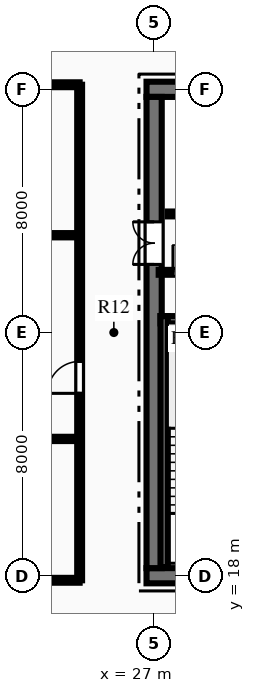
"""IFC4 building model, lengths in metres.
Left out: names, types, materials, properties, quantities, classifications, styles, units other than length and angle.
Written with IfcOpenShell. Run it as: python <this file> out.ifc"""

import sys

from ifc_helpers import new_model, si_unit, direction, frame, frame_2d, origin, place, context, subcontext, project, spatial, rectangle, extrude, element, fill, save


model = new_model("IFC4")
c1 = context("Model", 3, precision=1e-05, world=origin(), true_north=direction((0.0, 1.0)))
c2 = subcontext(c1, "Body", "Model", "MODEL_VIEW")
j1 = project(units=[si_unit("LENGTHUNIT", "METRE"), si_unit("PLANEANGLEUNIT", "RADIAN")], contexts=[c1])
p1 = place(None, origin())
s1 = spatial("IfcSite", under=j1, at=p1, CompositionType="ELEMENT")
p2 = place(p1, origin())
s2 = spatial("IfcBuilding", under=s1, at=p2, CompositionType="ELEMENT")
p3 = place(p2, frame((0.0, 0.0, 205.95)))
s3 = spatial("IfcBuildingStorey", under=s2, at=p3, CompositionType="ELEMENT", Elevation=205.95)
p4 = place(p3, frame((26.75, 18.0, 0.0), z_axis=(0.0, 0.0, 1.0), x_axis=(1.0, 0.0, 0.0)))
e1 = element("IfcWall", 1, at=p4, inside=s3, PredefinedType="SHEAR", context=c2, shape_type="SweptSolid", body=[
    extrude(rectangle(XDim=18.5, YDim=0.5, at=frame_2d((9.25, 0.0))), origin(), (0.0, 0.0, 1.0), 3.75),
])
p5 = place(p4, frame((7.35, 0.0, 0.0)))
e2 = element("IfcOpeningElement", 2, at=p5, cuts=e1, PredefinedType="OPENING", context=c2, shape_type="SweptSolid", body=[
    extrude(rectangle(XDim=1.1, YDim=2.15, at=frame_2d((0.55, 1.075))), frame((0.0, 0.26, 0.0), z_axis=(0.0, -1.0, 0.0), x_axis=(1.0, 0.0, 0.0)), (0.0, 0.0, 1.0), 0.52),
])
p6 = place(p4, frame((10.05, 0.0, 0.0)))
e3 = element("IfcOpeningElement", 3, at=p6, cuts=e1, PredefinedType="OPENING", context=c2, shape_type="SweptSolid", body=[
    extrude(rectangle(XDim=1.1, YDim=2.15, at=frame_2d((0.55, 1.075))), frame((0.0, 0.26, 0.0), z_axis=(0.0, -1.0, 0.0), x_axis=(1.0, 0.0, 0.0)), (0.0, 0.0, 1.0), 0.52),
])
p7 = place(p3, frame((26.75, 34.0, 0.0), z_axis=(0.0, 0.0, 1.0), x_axis=(1.0, 0.0, 0.0)))
e4 = element("IfcWall", 4, at=p7, inside=s3, PredefinedType="SHEAR", context=c2, shape_type="SweptSolid", body=[
    extrude(rectangle(XDim=18.5, YDim=0.5, at=frame_2d((9.25, 0.0))), origin(), (0.0, 0.0, 1.0), 3.75),
])
p8 = place(p7, frame((13.935, 0.0, 0.0)))
e5 = element("IfcOpeningElement", 5, at=p8, cuts=e4, PredefinedType="OPENING", context=c2, shape_type="SweptSolid", body=[
    extrude(rectangle(XDim=1.1, YDim=2.15, at=frame_2d((0.55, 1.075))), frame((0.0, 0.26, 0.0), z_axis=(0.0, -1.0, 0.0), x_axis=(1.0, 0.0, 0.0)), (0.0, 0.0, 1.0), 0.52),
])
p9 = place(p7, frame((16.185, 0.0, 0.0)))
e6 = element("IfcOpeningElement", 6, at=p9, cuts=e4, PredefinedType="OPENING", context=c2, shape_type="SweptSolid", body=[
    extrude(rectangle(XDim=1.1, YDim=2.15, at=frame_2d((0.55, 1.075))), frame((0.0, 0.26, 0.0), z_axis=(0.0, -1.0, 0.0), x_axis=(1.0, 0.0, 0.0)), (0.0, 0.0, 1.0), 0.52),
])
p10 = place(p3, frame((27.0, 18.25, 0.0), z_axis=(0.0, 0.0, 1.0), x_axis=(0.0, 1.0, 0.0)))
e7 = element("IfcWall", 7, at=p10, inside=s3, PredefinedType="SHEAR", context=c2, shape_type="SweptSolid", body=[
    extrude(rectangle(XDim=15.5, YDim=0.5, at=frame_2d((7.75, 0.0))), origin(), (0.0, 0.0, 1.0), 3.75),
])
p11 = place(p10, frame((9.99, 0.0, 0.0)))
e8 = element("IfcOpeningElement", 8, at=p11, cuts=e7, PredefinedType="OPENING", context=c2, shape_type="SweptSolid", body=[
    extrude(rectangle(XDim=1.4, YDim=2.2, at=frame_2d((0.7, 1.1))), frame((0.0, 0.26, 0.0), z_axis=(0.0, -1.0, 0.0), x_axis=(1.0, 0.0, 0.0)), (0.0, 0.0, 1.0), 0.52),
])
p12 = place(p3, frame((27.21, 26.42, 0.0), z_axis=(0.0, 0.0, 1.0), x_axis=(1.0, 0.0, 0.0)))
e9 = element("IfcWall", 9, at=p12, inside=s3, PredefinedType="SHEAR", context=c2, shape_type="SweptSolid", body=[
    extrude(rectangle(XDim=3.98, YDim=0.24, at=frame_2d((1.99, 0.0))), origin(), (0.0, 0.0, 1.0), 3.75),
])
p13 = place(p3, frame((27.33, 18.28, 0.0), z_axis=(0.0, 0.0, 1.0), x_axis=(0.0, 1.0, 0.0)))
e10 = element("IfcWall", 10, at=p13, inside=s3, PredefinedType="SHEAR", context=c2, shape_type="SweptSolid", body=[
    extrude(rectangle(XDim=8.26, YDim=0.24, at=frame_2d((4.13, 0.0))), origin(), (0.0, 0.0, 1.0), 3.75),
])
p14 = place(p3, frame((27.15, 27.98, 0.0), z_axis=(0.0, 0.0, 1.0), x_axis=(1.0, 0.0, 0.0)))
e11 = element("IfcWall", 11, at=p14, inside=s3, PredefinedType="PARTITIONING", context=c2, shape_type="SweptSolid", body=[
    extrude(rectangle(XDim=4.05, YDim=0.16, at=frame_2d((2.025, 0.0))), origin(), (0.0, 0.0, 1.0), 3.47),
])
p15 = place(p14, frame((0.47, 0.0, 0.0)))
e12 = element("IfcOpeningElement", 12, at=p15, cuts=e11, PredefinedType="OPENING", context=c2, shape_type="SweptSolid", body=[
    extrude(rectangle(XDim=0.9, YDim=2.15, at=frame_2d((0.45, 1.075))), frame((0.0, 0.09, 0.0), z_axis=(0.0, -1.0, 0.0), x_axis=(1.0, 0.0, 0.0)), (0.0, 0.0, 1.0), 0.18),
])
p16 = place(p14, frame((2.36, 0.0, 0.0)))
e13 = element("IfcOpeningElement", 13, at=p16, cuts=e11, PredefinedType="OPENING", context=c2, shape_type="SweptSolid", body=[
    extrude(rectangle(XDim=0.9, YDim=2.15, at=frame_2d((0.45, 1.075))), frame((0.0, 0.09, 0.0), z_axis=(0.0, -1.0, 0.0), x_axis=(1.0, 0.0, 0.0)), (0.0, 0.0, 1.0), 0.18),
])
p17 = place(p3, frame((27.45, 29.9, 0.0), z_axis=(0.0, 0.0, 1.0), x_axis=(1.0, 0.0, 0.0)))
e14 = element("IfcWall", 14, at=p17, inside=s3, PredefinedType="PARTITIONING", context=c2, shape_type="SweptSolid", body=[
    extrude(rectangle(XDim=4.43, YDim=0.16, at=frame_2d((2.215, 0.0))), origin(), (0.0, 0.0, 1.0), 3.47),
])
p18 = place(p17, frame((0.6, 0.0, 0.0)))
e15 = element("IfcOpeningElement", 15, at=p18, cuts=e14, PredefinedType="OPENING", context=c2, shape_type="SweptSolid", body=[
    extrude(rectangle(XDim=0.9, YDim=2.15, at=frame_2d((0.45, 1.075))), frame((0.0, 0.09, 0.0), z_axis=(0.0, -1.0, 0.0), x_axis=(1.0, 0.0, 0.0)), (0.0, 0.0, 1.0), 0.18),
])
p19 = place(p17, frame((2.85, 0.0, 0.0)))
e16 = element("IfcOpeningElement", 16, at=p19, cuts=e14, PredefinedType="OPENING", context=c2, shape_type="SweptSolid", body=[
    extrude(rectangle(XDim=0.9, YDim=2.15, at=frame_2d((0.45, 1.075))), frame((0.0, 0.09, 0.0), z_axis=(0.0, -1.0, 0.0), x_axis=(1.0, 0.0, 0.0)), (0.0, 0.0, 1.0), 0.18),
])
p20 = place(p3, frame((18.2, 17.85, 0.0), z_axis=(0.0, 0.0, 1.0), x_axis=(1.0, 0.0, 0.0)))
e17 = element("IfcWall", 17, at=p20, inside=s3, PredefinedType="PARTITIONING", context=c2, shape_type="SweptSolid", body=[
    extrude(rectangle(XDim=6.35, YDim=0.16, at=frame_2d((3.175, 0.0))), origin(), (0.0, 0.0, 1.0), 3.47),
])
p21 = place(p20, frame((3.793, 0.0, 0.0)))
e18 = element("IfcOpeningElement", 18, at=p21, cuts=e17, PredefinedType="OPENING", context=c2, shape_type="SweptSolid", body=[
    extrude(rectangle(XDim=1.05, YDim=2.15, at=frame_2d((0.525, 1.075))), frame((0.0, 0.09, 0.0), z_axis=(0.0, -1.0, 0.0), x_axis=(1.0, 0.0, 0.0)), (0.0, 0.0, 1.0), 0.18),
])
p22 = place(p3, frame((18.2, 34.15, 0.0), z_axis=(0.0, 0.0, 1.0), x_axis=(1.0, 0.0, 0.0)))
e19 = element("IfcWall", 19, at=p22, inside=s3, PredefinedType="PARTITIONING", context=c2, shape_type="SweptSolid", body=[
    extrude(rectangle(XDim=6.35, YDim=0.16, at=frame_2d((3.175, 0.0))), origin(), (0.0, 0.0, 1.0), 3.47),
])
p23 = place(p22, frame((3.793, 0.0, 0.0)))
e20 = element("IfcOpeningElement", 20, at=p23, cuts=e19, PredefinedType="OPENING", context=c2, shape_type="SweptSolid", body=[
    extrude(rectangle(XDim=1.05, YDim=2.15, at=frame_2d((0.525, 1.075))), frame((0.0, 0.09, 0.0), z_axis=(0.0, -1.0, 0.0), x_axis=(1.0, 0.0, 0.0)), (0.0, 0.0, 1.0), 0.18),
])
p24 = place(p3, frame((24.55, 17.85, 0.0), z_axis=(0.0, 0.0, 1.0), x_axis=(0.0, 1.0, 0.0)))
e21 = element("IfcWall", 21, at=p24, inside=s3, PredefinedType="PARTITIONING", context=c2, shape_type="SweptSolid", body=[
    extrude(rectangle(XDim=16.3, YDim=0.16, at=frame_2d((8.15, 0.0))), origin(), (0.0, 0.0, 1.0), 3.47),
])
p25 = place(p24, frame((6.149, 0.0, 0.0)))
e22 = element("IfcOpeningElement", 22, at=p25, cuts=e21, PredefinedType="OPENING", context=c2, shape_type="SweptSolid", body=[
    extrude(rectangle(XDim=1.05, YDim=2.15, at=frame_2d((0.525, 1.075))), frame((0.0, 0.09, 0.0), z_axis=(0.0, -1.0, 0.0), x_axis=(1.0, 0.0, 0.0)), (0.0, 0.0, 1.0), 0.18),
])
p26 = place(p3, frame((6.875, 22.5, 0.0), z_axis=(0.0, 0.0, 1.0), x_axis=(1.0, 0.0, 0.0)))
e23 = element("IfcWall", 23, at=p26, inside=s3, PredefinedType="PARTITIONING", context=c2, shape_type="SweptSolid", body=[
    extrude(rectangle(XDim=17.675, YDim=0.14, at=frame_2d((8.837, 0.0))), origin(), (0.0, 0.0, 1.0), 3.47),
])
p27 = place(p3, frame((10.009, 29.2, 0.0), z_axis=(0.0, 0.0, 1.0), x_axis=(1.0, 0.0, 0.0)))
e24 = element("IfcWall", 24, at=p27, inside=s3, PredefinedType="PARTITIONING", context=c2, shape_type="SweptSolid", body=[
    extrude(rectangle(XDim=14.541, YDim=0.14, at=frame_2d((7.271, 0.0))), origin(), (0.0, 0.0, 1.0), 3.47),
])
p28 = place(p15, origin())
e25 = element("IfcDoor", 25, at=p28, inside=s3, OperationType="SINGLE_SWING_LEFT", PredefinedType="DOOR", context=c2, shape_type="SweptSolid", body=[
    extrude(rectangle(XDim=0.9, YDim=2.15, at=frame_2d((0.45, 1.075))), frame((0.0, 0.025, 0.0), z_axis=(0.0, -1.0, 0.0), x_axis=(1.0, 0.0, 0.0)), (0.0, 0.0, 1.0), 0.05),
])
fill(e12, e25)
p29 = place(p11, origin())
e26 = element("IfcDoor", 26, at=p29, inside=s3, OperationType="DOUBLE_DOOR_SINGLE_SWING", PredefinedType="DOOR", context=c2, shape_type="SweptSolid", body=[
    extrude(rectangle(XDim=1.4, YDim=2.2, at=frame_2d((0.7, 1.1))), frame((0.0, 0.025, 0.0), z_axis=(0.0, -1.0, 0.0), x_axis=(1.0, 0.0, 0.0)), (0.0, 0.0, 1.0), 0.05),
])
fill(e8, e26)
p30 = place(p25, origin())
e27 = element("IfcDoor", 27, at=p30, inside=s3, OperationType="SINGLE_SWING_LEFT", PredefinedType="DOOR", context=c2, shape_type="SweptSolid", body=[
    extrude(rectangle(XDim=1.05, YDim=2.15, at=frame_2d((0.525, 1.075))), frame((0.0, 0.025, 0.0), z_axis=(0.0, -1.0, 0.0), x_axis=(1.0, 0.0, 0.0)), (0.0, 0.0, 1.0), 0.05),
])
fill(e22, e27)
save(model, sys.argv[1])
